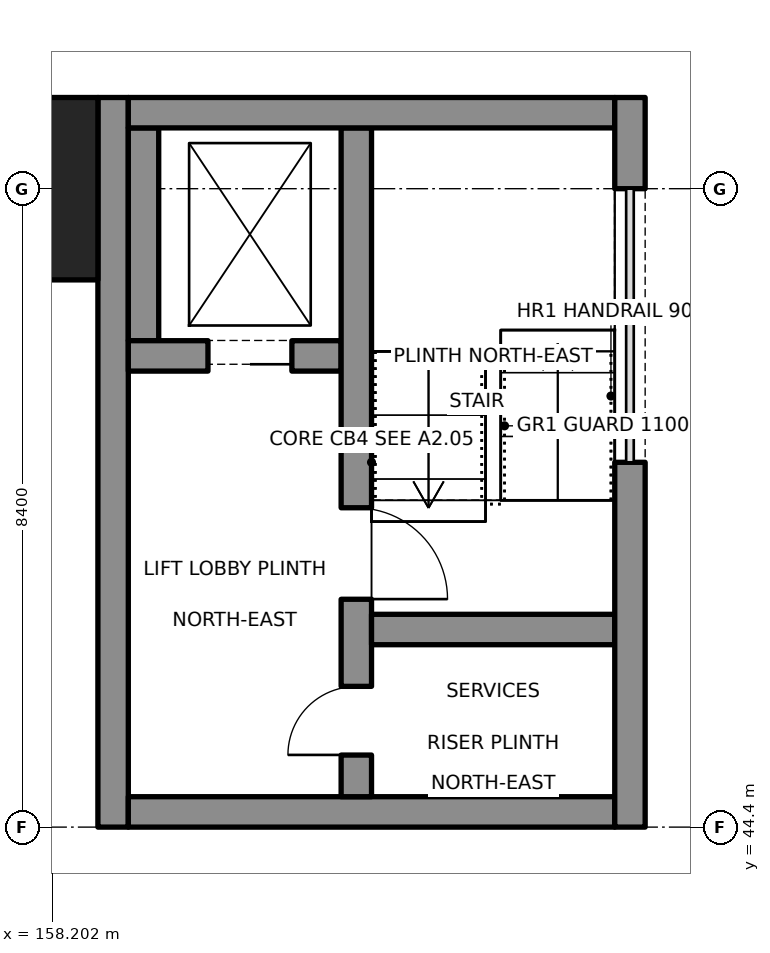
"""IFC4 building model, lengths in metres.
Left out: names, types, materials, properties, quantities, classifications, styles, units other than length and angle.
Written with IfcOpenShell. Run it as: python <this file> out.ifc"""

import sys

from ifc_helpers import new_model, si_unit, direction, frame, frame_2d, origin, origin_2d, place, context, subcontext, project, spatial, rectangle, extrude, element, fill, save


model = new_model("IFC4")
c1 = context("Model", 3, precision=1e-05, world=origin(), true_north=direction((0.0, 1.0)))
c2 = subcontext(c1, "Body", "Model", "MODEL_VIEW")
j1 = project(units=[si_unit("LENGTHUNIT", "METRE"), si_unit("PLANEANGLEUNIT", "RADIAN")], contexts=[c1])
p1 = place(None, origin())
s1 = spatial("IfcSite", under=j1, at=p1, CompositionType="ELEMENT")
p2 = place(p1, origin())
s2 = spatial("IfcBuilding", under=s1, at=p2, CompositionType="ELEMENT")
p3 = place(p2, frame((0.0, 0.0, 8.8)))
s3 = spatial("IfcBuildingStorey", under=s2, at=p3, CompositionType="ELEMENT", Elevation=8.8)
p4 = place(p3, frame((157.6, 52.8, 0.0), z_axis=(0.0, 0.0, 1.0), x_axis=(1.0, 0.0, 0.0)))
e1 = element("IfcColumn", 1, at=p4, inside=s3, PredefinedType="COLUMN", context=c2, shape_type="SweptSolid", body=[
    extrude(rectangle(XDim=2.4, YDim=2.4, at=origin_2d()), origin(), (0.0, 0.0, 1.0), 3.65),
])
p5 = place(p3, frame((165.8, 49.2, 0.0), z_axis=(0.0, 0.0, 1.0), x_axis=(0.0, -1.0, 0.0)))
e2 = element("IfcWall", 2, at=p5, inside=s3, PredefinedType="SHEAR", context=c2, shape_type="SweptSolid", body=[
    extrude(rectangle(XDim=4.8, YDim=0.4, at=frame_2d((2.4, 0.0))), origin(), (0.0, 0.0, 1.0), 5.2),
])
p6 = place(p3, frame((165.8, 54.0, 0.0), z_axis=(0.0, 0.0, 1.0), x_axis=(0.0, -1.0, 0.0)))
e3 = element("IfcWall", 3, at=p6, inside=s3, PredefinedType="SHEAR", context=c2, shape_type="SweptSolid", body=[
    extrude(rectangle(XDim=1.2, YDim=0.4, at=frame_2d((0.6, 0.0))), origin(), (0.0, 0.0, 1.0), 5.2),
])
p7 = place(p3, frame((159.0, 44.4, 0.0), z_axis=(0.0, 0.0, 1.0), x_axis=(0.0, 1.0, 0.0)))
e4 = element("IfcWall", 4, at=p7, inside=s3, PredefinedType="SHEAR", context=c2, shape_type="SweptSolid", body=[
    extrude(rectangle(XDim=9.6, YDim=0.4, at=frame_2d((4.8, 0.0))), origin(), (0.0, 0.0, 1.0), 5.2),
])
for number, where, z_axis, x_axis in (
    (5, (159.2, 53.8, 0.0), (0.0, 0.0, 1.0), (1.0, 0.0, 0.0)),
    (6, (159.2, 44.6, 0.0), (0.0, 0.0, 1.0), (1.0, 0.0, 0.0)),
):
    element("IfcWall", number, at=place(p3, frame(where, z_axis=z_axis, x_axis=x_axis)), inside=s3, PredefinedType="SHEAR", context=c2, shape_type="SweptSolid", body=[
        extrude(rectangle(XDim=6.4, YDim=0.4, at=frame_2d((3.2, 0.0))), origin(), (0.0, 0.0, 1.0), 5.2),
    ])
p8 = place(p3, frame((162.2, 44.8, 0.0), z_axis=(0.0, 0.0, 1.0), x_axis=(0.0, 1.0, 0.0)))
e7 = element("IfcWall", 7, at=p8, inside=s3, PredefinedType="SHEAR", context=c2, shape_type="SweptSolid", body=[
    extrude(rectangle(XDim=8.8, YDim=0.4, at=frame_2d((4.4, 0.0))), origin(), (0.0, 0.0, 1.0), 5.2),
])
p9 = place(p8, frame((2.6, 0.0, 0.0)))
e8 = element("IfcOpeningElement", 8, at=p9, cuts=e7, PredefinedType="OPENING", context=c2, shape_type="SweptSolid", body=[
    extrude(rectangle(XDim=1.2, YDim=2.1, at=frame_2d((0.6, 1.05))), frame((0.0, 0.21, 0.0), z_axis=(0.0, -1.0, 0.0), x_axis=(1.0, 0.0, 0.0)), (0.0, 0.0, 1.0), 0.42),
])
p10 = place(p8, frame((0.55, 0.0, 0.0)))
e9 = element("IfcOpeningElement", 9, at=p10, cuts=e7, PredefinedType="OPENING", context=c2, shape_type="SweptSolid", body=[
    extrude(rectangle(XDim=0.9, YDim=2.1, at=frame_2d((0.45, 1.05))), frame((0.0, 0.21, 0.0), z_axis=(0.0, -1.0, 0.0), x_axis=(1.0, 0.0, 0.0)), (0.0, 0.0, 1.0), 0.42),
])
p11 = place(p3, frame((162.4, 47.0, 0.0), z_axis=(0.0, 0.0, 1.0), x_axis=(1.0, 0.0, 0.0)))
e10 = element("IfcWall", 10, at=p11, inside=s3, PredefinedType="SHEAR", context=c2, shape_type="SweptSolid", body=[
    extrude(rectangle(XDim=3.2, YDim=0.4, at=frame_2d((1.6, 0.0))), origin(), (0.0, 0.0, 1.0), 5.2),
])
p12 = place(p3, frame((159.2, 50.6, 0.0), z_axis=(0.0, 0.0, 1.0), x_axis=(1.0, 0.0, 0.0)))
e11 = element("IfcWall", 11, at=p12, inside=s3, PredefinedType="SHEAR", context=c2, shape_type="SweptSolid", body=[
    extrude(rectangle(XDim=2.8, YDim=0.4, at=frame_2d((1.4, 0.0))), origin(), (0.0, 0.0, 1.0), 5.2),
])
p13 = place(p12, frame((1.05, 0.0, 0.0)))
e12 = element("IfcOpeningElement", 12, at=p13, cuts=e11, PredefinedType="OPENING", context=c2, shape_type="SweptSolid", body=[
    extrude(rectangle(XDim=1.1, YDim=2.1, at=frame_2d((0.55, 1.05))), frame((0.0, 0.21, 0.0), z_axis=(0.0, -1.0, 0.0), x_axis=(1.0, 0.0, 0.0)), (0.0, 0.0, 1.0), 0.42),
])
p14 = place(p3, frame((159.4, 50.8, 0.0), z_axis=(0.0, 0.0, 1.0), x_axis=(0.0, 1.0, 0.0)))
e13 = element("IfcWall", 13, at=p14, inside=s3, PredefinedType="SHEAR", context=c2, shape_type="SweptSolid", body=[
    extrude(rectangle(XDim=2.8, YDim=0.4, at=frame_2d((1.4, 0.0))), origin(), (0.0, 0.0, 1.0), 5.2),
])
p15 = place(p9, origin())
e14 = element("IfcDoor", 14, at=p15, inside=s3, OperationType="SINGLE_SWING_LEFT", PredefinedType="DOOR", context=c2, shape_type="SweptSolid", body=[
    extrude(rectangle(XDim=1.2, YDim=2.1, at=frame_2d((0.6, 1.05))), frame((0.0, 0.025, 0.0), z_axis=(0.0, -1.0, 0.0), x_axis=(1.0, 0.0, 0.0)), (0.0, 0.0, 1.0), 0.05),
])
fill(e8, e14)
p16 = place(p10, origin())
e15 = element("IfcDoor", 15, at=p16, inside=s3, OperationType="SINGLE_SWING_LEFT", PredefinedType="DOOR", context=c2, shape_type="SweptSolid", body=[
    extrude(rectangle(XDim=0.9, YDim=2.1, at=frame_2d((0.45, 1.05))), frame((0.0, 0.025, 0.0), z_axis=(0.0, -1.0, 0.0), x_axis=(1.0, 0.0, 0.0)), (0.0, 0.0, 1.0), 0.05),
])
fill(e9, e15)
p17 = place(p13, origin())
e16 = element("IfcDoor", 16, at=p17, inside=s3, OperationType="SLIDING_TO_LEFT", PredefinedType="DOOR", context=c2, shape_type="SweptSolid", body=[
    extrude(rectangle(XDim=1.1, YDim=2.1, at=frame_2d((0.55, 1.05))), frame((0.0, 0.025, 0.0), z_axis=(0.0, -1.0, 0.0), x_axis=(1.0, 0.0, 0.0)), (0.0, 0.0, 1.0), 0.05),
])
fill(e12, e16)
save(model, sys.argv[1])
